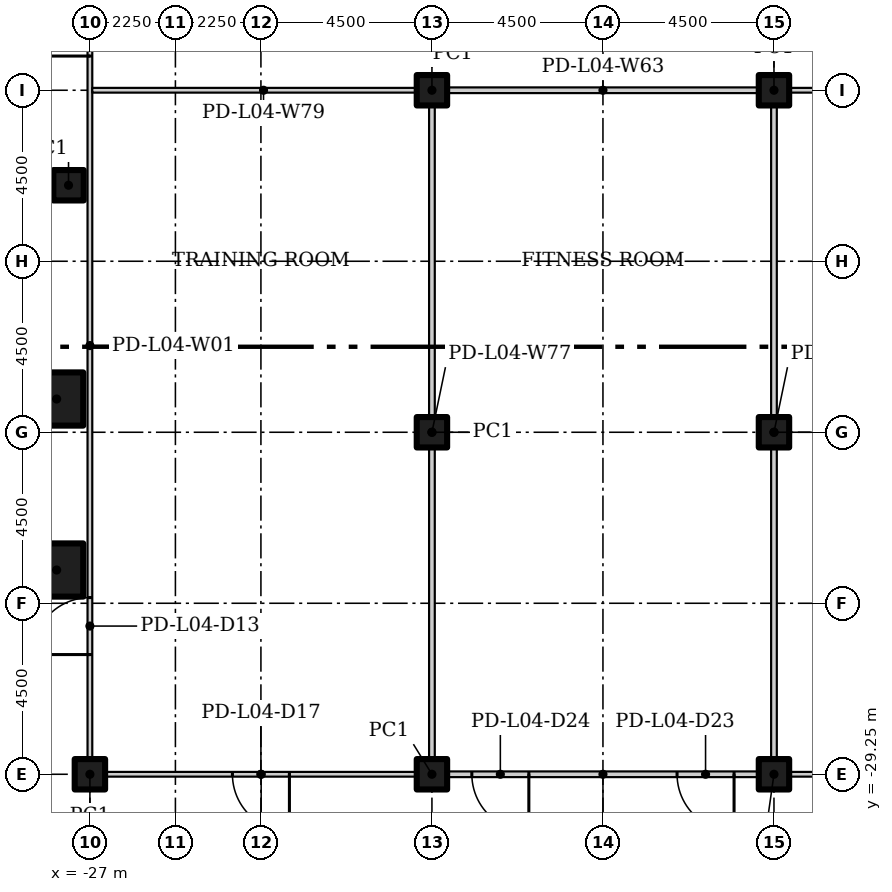
"""IFC4 building model, lengths in metres.
Left out: names, types, materials, properties, quantities, classifications, styles, units other than length and angle.
Written with IfcOpenShell. Run it as: python <this file> out.ifc"""

import sys

from ifc_helpers import new_model, si_unit, direction, frame, frame_2d, origin, origin_2d, place, context, subcontext, project, spatial, rectangle, hollow_rectangle, extrude, element, fill, save


model = new_model("IFC4")
c1 = context("Model", 3, precision=1e-05, world=origin(), true_north=direction((0.0, 1.0)))
c2 = subcontext(c1, "Body", "Model", "MODEL_VIEW")
j1 = project(units=[si_unit("LENGTHUNIT", "METRE"), si_unit("PLANEANGLEUNIT", "RADIAN")], contexts=[c1])
p1 = place(None, origin())
s1 = spatial("IfcSite", under=j1, at=p1, CompositionType="ELEMENT")
p2 = place(p1, origin())
s2 = spatial("IfcBuilding", under=s1, at=p2, CompositionType="ELEMENT")
p3 = place(p2, frame((0.0, 0.0, 23.5)))
s3 = spatial("IfcBuildingStorey", under=s2, at=p3, CompositionType="ELEMENT", Elevation=23.5)
p4 = place(p3, frame((-27.562, -13.75, 0.0)))
e1 = element("IfcColumn", 1, at=p4, inside=s3, PredefinedType="COLUMN", context=c2, shape_type="SweptSolid", body=[
    extrude(hollow_rectangle(XDim=0.8, YDim=0.8, WallThickness=0.03, at=origin_2d()), origin(), (0.0, 0.0, 1.0), 4.65),
])
for number, where in (
    (2, (-27.875, -19.375, 0.0)),
    (3, (-27.875, -23.875, 0.0)),
):
    element("IfcColumn", number, at=place(p3, frame(where)), inside=s3, PredefinedType="COLUMN", context=c2, shape_type="SweptSolid", body=[
        extrude(hollow_rectangle(XDim=1.4, YDim=1.4, WallThickness=0.06, at=origin_2d()), origin(), (0.0, 0.0, 1.0), 4.65),
    ])
for number, where in (
    (4, (-27.0, -29.25, 0.0)),
    (5, (-18.0, -29.25, 0.0)),
    (6, (-18.0, -20.25, 0.0)),
    (7, (-18.0, -11.25, 0.0)),
    (8, (-9.0, -29.25, 0.0)),
    (9, (-9.0, -20.25, 0.0)),
    (10, (-9.0, -11.25, 0.0)),
):
    element("IfcColumn", number, at=place(p3, frame(where)), inside=s3, PredefinedType="COLUMN", context=c2, shape_type="SweptSolid", body=[
        extrude(hollow_rectangle(XDim=0.8, YDim=0.8, WallThickness=0.03, at=origin_2d()), origin(), (0.0, 0.0, 1.0), 4.65),
    ])
p5 = place(p3, frame((-27.0, -29.188, 0.0), z_axis=(0.0, 0.0, 1.0), x_axis=(0.0, 1.0, 0.0)))
e11 = element("IfcWall", 11, at=p5, inside=s3, PredefinedType="PARTITIONING", context=c2, shape_type="SweptSolid", body=[
    extrude(rectangle(XDim=22.438, YDim=0.125, at=frame_2d((11.219, 0.0))), origin(), (0.0, 0.0, 1.0), 4.65),
])
p6 = place(p5, frame((3.087, 0.0, 0.0)))
e12 = element("IfcOpeningElement", 12, at=p6, cuts=e11, PredefinedType="OPENING", context=c2, shape_type="SweptSolid", body=[
    extrude(rectangle(XDim=1.5, YDim=2.1, at=frame_2d((0.75, 1.05))), frame((0.0, 0.073, 0.0), z_axis=(0.0, -1.0, 0.0), x_axis=(1.0, 0.0, 0.0)), (0.0, 0.0, 1.0), 0.145),
])
p7 = place(p5, frame((18.837, 0.0, 0.0)))
e13 = element("IfcOpeningElement", 13, at=p7, cuts=e11, PredefinedType="OPENING", context=c2, shape_type="SweptSolid", body=[
    extrude(rectangle(XDim=1.5, YDim=2.1, at=frame_2d((0.75, 1.05))), frame((0.0, 0.073, 0.0), z_axis=(0.0, -1.0, 0.0), x_axis=(1.0, 0.0, 0.0)), (0.0, 0.0, 1.0), 0.145),
])
p8 = place(p3, frame((-8.925, -29.25, 0.0), z_axis=(0.0, 0.0, 1.0), x_axis=(-1.0, 0.0, 0.0)))
e14 = element("IfcWall", 14, at=p8, inside=s3, PredefinedType="PARTITIONING", context=c2, shape_type="SweptSolid", body=[
    extrude(rectangle(XDim=9.15, YDim=0.15, at=frame_2d((4.575, 0.0))), origin(), (0.0, 0.0, 1.0), 4.65),
])
p9 = place(p8, frame((1.125, 0.0, 0.0)))
e15 = element("IfcOpeningElement", 15, at=p9, cuts=e14, PredefinedType="OPENING", context=c2, shape_type="SweptSolid", body=[
    extrude(rectangle(XDim=1.5, YDim=2.1, at=frame_2d((0.75, 1.05))), frame((0.0, 0.085, 0.0), z_axis=(0.0, -1.0, 0.0), x_axis=(1.0, 0.0, 0.0)), (0.0, 0.0, 1.0), 0.17),
])
p10 = place(p8, frame((6.525, 0.0, 0.0)))
e16 = element("IfcOpeningElement", 16, at=p10, cuts=e14, PredefinedType="OPENING", context=c2, shape_type="SweptSolid", body=[
    extrude(rectangle(XDim=1.5, YDim=2.1, at=frame_2d((0.75, 1.05))), frame((0.0, 0.085, 0.0), z_axis=(0.0, -1.0, 0.0), x_axis=(1.0, 0.0, 0.0)), (0.0, 0.0, 1.0), 0.17),
])
p11 = place(p3, frame((0.075, -29.25, 0.0), z_axis=(0.0, 0.0, 1.0), x_axis=(-1.0, 0.0, 0.0)))
e17 = element("IfcWall", 17, at=p11, inside=s3, PredefinedType="PARTITIONING", context=c2, shape_type="SweptSolid", body=[
    extrude(rectangle(XDim=9.15, YDim=0.125, at=frame_2d((4.575, 0.0))), origin(), (0.0, 0.0, 1.0), 4.65),
])
p12 = place(p11, frame((1.125, 0.0, 0.0)))
e18 = element("IfcOpeningElement", 18, at=p12, cuts=e17, PredefinedType="OPENING", context=c2, shape_type="SweptSolid", body=[
    extrude(rectangle(XDim=1.5, YDim=2.1, at=frame_2d((0.75, 1.05))), frame((0.0, 0.073, 0.0), z_axis=(0.0, -1.0, 0.0), x_axis=(1.0, 0.0, 0.0)), (0.0, 0.0, 1.0), 0.145),
])
p13 = place(p11, frame((6.525, 0.0, 0.0)))
e19 = element("IfcOpeningElement", 19, at=p13, cuts=e17, PredefinedType="OPENING", context=c2, shape_type="SweptSolid", body=[
    extrude(rectangle(XDim=1.5, YDim=2.1, at=frame_2d((0.75, 1.05))), frame((0.0, 0.073, 0.0), z_axis=(0.0, -1.0, 0.0), x_axis=(1.0, 0.0, 0.0)), (0.0, 0.0, 1.0), 0.145),
])
p14 = place(p3, frame((-17.925, -29.25, 0.0), z_axis=(0.0, 0.0, 1.0), x_axis=(-1.0, 0.0, 0.0)))
e20 = element("IfcWall", 20, at=p14, inside=s3, PredefinedType="PARTITIONING", context=c2, shape_type="SweptSolid", body=[
    extrude(rectangle(XDim=9.137, YDim=0.125, at=frame_2d((4.569, 0.0))), origin(), (0.0, 0.0, 1.0), 4.65),
])
p15 = place(p14, frame((3.825, 0.0, 0.0)))
e21 = element("IfcOpeningElement", 21, at=p15, cuts=e20, PredefinedType="OPENING", context=c2, shape_type="SweptSolid", body=[
    extrude(rectangle(XDim=1.5, YDim=2.1, at=frame_2d((0.75, 1.05))), frame((0.0, 0.073, 0.0), z_axis=(0.0, -1.0, 0.0), x_axis=(1.0, 0.0, 0.0)), (0.0, 0.0, 1.0), 0.145),
])
p16 = place(p3, frame((-8.925, -11.25, 0.0), z_axis=(0.0, 0.0, 1.0), x_axis=(-1.0, 0.0, 0.0)))
e22 = element("IfcWall", 22, at=p16, inside=s3, PredefinedType="PARTITIONING", context=c2, shape_type="SweptSolid", body=[
    extrude(rectangle(XDim=9.15, YDim=0.15, at=frame_2d((4.575, 0.0))), origin(), (0.0, 0.0, 1.0), 4.65),
])
p17 = place(p3, frame((-18.0, -29.175, 0.0), z_axis=(0.0, 0.0, 1.0), x_axis=(0.0, 1.0, 0.0)))
e23 = element("IfcWall", 23, at=p17, inside=s3, PredefinedType="PARTITIONING", context=c2, shape_type="SweptSolid", body=[
    extrude(rectangle(XDim=17.85, YDim=0.15, at=frame_2d((8.925, 0.0))), origin(), (0.0, 0.0, 1.0), 4.65),
])
p18 = place(p3, frame((0.075, -11.25, 0.0), z_axis=(0.0, 0.0, 1.0), x_axis=(-1.0, 0.0, 0.0)))
e24 = element("IfcWall", 24, at=p18, inside=s3, PredefinedType="PARTITIONING", context=c2, shape_type="SweptSolid", body=[
    extrude(rectangle(XDim=9.15, YDim=0.125, at=frame_2d((4.575, 0.0))), origin(), (0.0, 0.0, 1.0), 4.65),
])
p19 = place(p3, frame((-17.925, -11.25, 0.0), z_axis=(0.0, 0.0, 1.0), x_axis=(-1.0, 0.0, 0.0)))
e25 = element("IfcWall", 25, at=p19, inside=s3, PredefinedType="PARTITIONING", context=c2, shape_type="SweptSolid", body=[
    extrude(rectangle(XDim=9.012, YDim=0.125, at=frame_2d((4.506, 0.0))), origin(), (0.0, 0.0, 1.0), 4.65),
])
p20 = place(p3, frame((-9.0, -29.175, 0.0), z_axis=(0.0, 0.0, 1.0), x_axis=(0.0, 1.0, 0.0)))
e26 = element("IfcWall", 26, at=p20, inside=s3, PredefinedType="PARTITIONING", context=c2, shape_type="SweptSolid", body=[
    extrude(rectangle(XDim=17.85, YDim=0.15, at=frame_2d((8.925, 0.0))), origin(), (0.0, 0.0, 1.0), 4.65),
])
p21 = place(p6, origin())
e27 = element("IfcDoor", 27, at=p21, inside=s3, OperationType="DOUBLE_DOOR_SINGLE_SWING", PredefinedType="DOOR", context=c2, shape_type="SweptSolid", body=[
    extrude(rectangle(XDim=1.5, YDim=2.1, at=frame_2d((0.75, 1.05))), frame((0.0, 0.025, 0.0), z_axis=(0.0, -1.0, 0.0), x_axis=(1.0, 0.0, 0.0)), (0.0, 0.0, 1.0), 0.05),
])
fill(e12, e27)
p22 = place(p7, origin())
e28 = element("IfcDoor", 28, at=p22, inside=s3, OperationType="DOUBLE_DOOR_SINGLE_SWING", PredefinedType="DOOR", context=c2, shape_type="SweptSolid", body=[
    extrude(rectangle(XDim=1.5, YDim=2.1, at=frame_2d((0.75, 1.05))), frame((0.0, 0.025, 0.0), z_axis=(0.0, -1.0, 0.0), x_axis=(1.0, 0.0, 0.0)), (0.0, 0.0, 1.0), 0.05),
])
fill(e13, e28)
p23 = place(p15, origin())
e29 = element("IfcDoor", 29, at=p23, inside=s3, OperationType="DOUBLE_DOOR_SINGLE_SWING", PredefinedType="DOOR", context=c2, shape_type="SweptSolid", body=[
    extrude(rectangle(XDim=1.5, YDim=2.1, at=frame_2d((0.75, 1.05))), frame((0.0, 0.025, 0.0), z_axis=(0.0, -1.0, 0.0), x_axis=(1.0, 0.0, 0.0)), (0.0, 0.0, 1.0), 0.05),
])
fill(e21, e29)
p24 = place(p9, origin())
e30 = element("IfcDoor", 30, at=p24, inside=s3, OperationType="DOUBLE_DOOR_SINGLE_SWING", PredefinedType="DOOR", context=c2, shape_type="SweptSolid", body=[
    extrude(rectangle(XDim=1.5, YDim=2.1, at=frame_2d((0.75, 1.05))), frame((0.0, 0.025, 0.0), z_axis=(0.0, -1.0, 0.0), x_axis=(1.0, 0.0, 0.0)), (0.0, 0.0, 1.0), 0.05),
])
fill(e15, e30)
p25 = place(p10, origin())
e31 = element("IfcDoor", 31, at=p25, inside=s3, OperationType="DOUBLE_DOOR_SINGLE_SWING", PredefinedType="DOOR", context=c2, shape_type="SweptSolid", body=[
    extrude(rectangle(XDim=1.5, YDim=2.1, at=frame_2d((0.75, 1.05))), frame((0.0, 0.025, 0.0), z_axis=(0.0, -1.0, 0.0), x_axis=(1.0, 0.0, 0.0)), (0.0, 0.0, 1.0), 0.05),
])
fill(e16, e31)
save(model, sys.argv[1])
